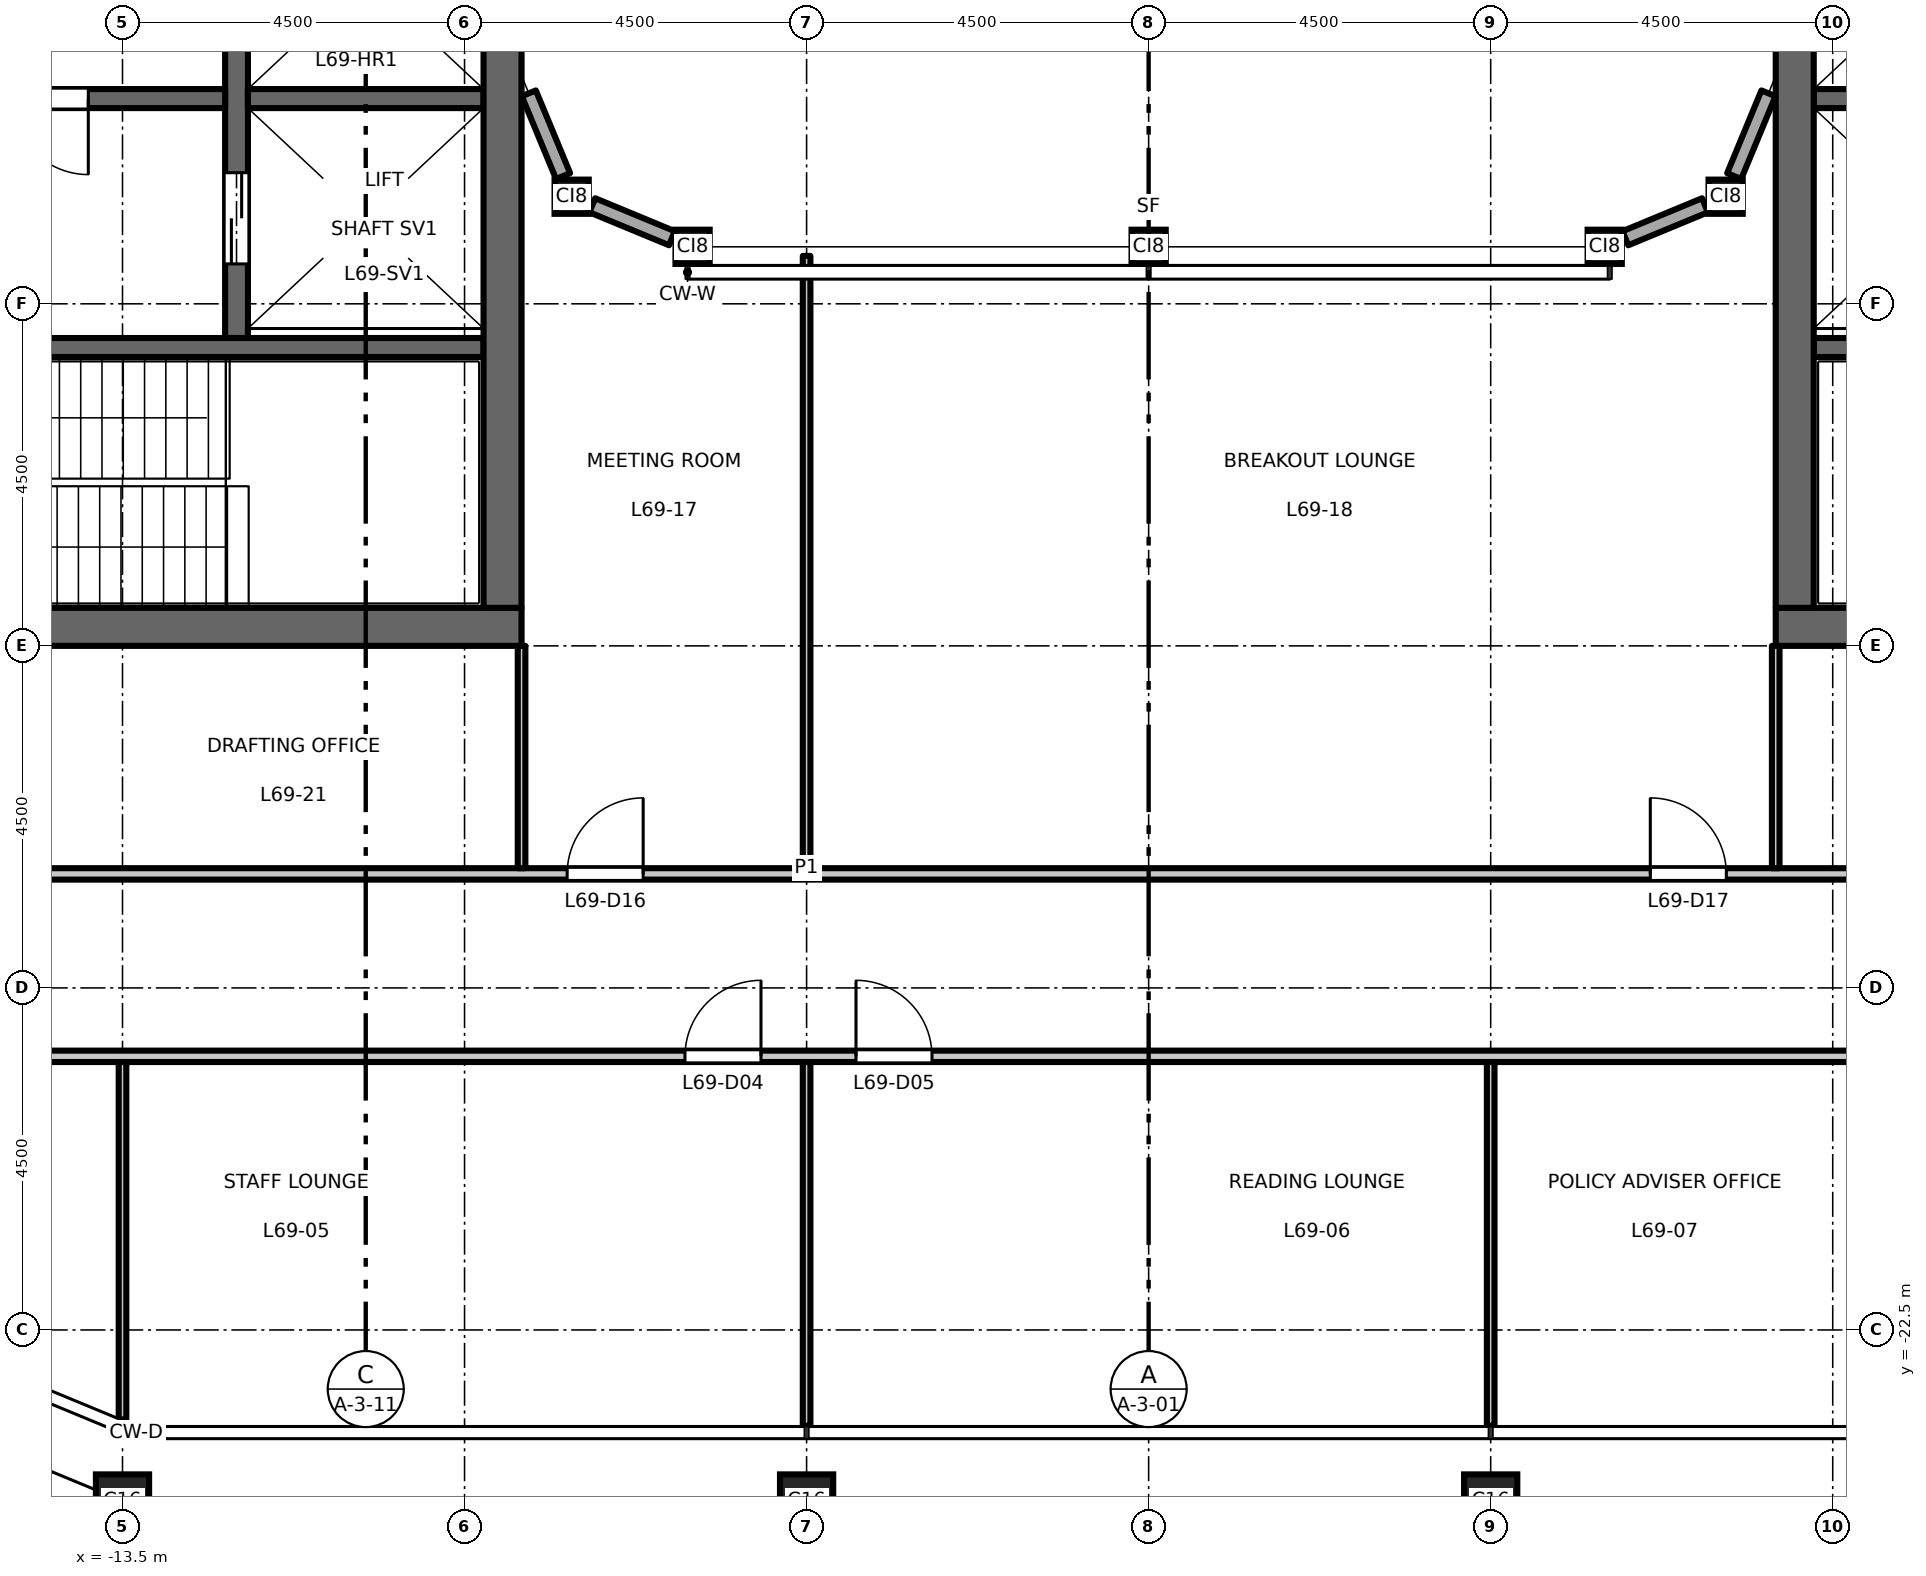
"""IFC4 building model, lengths in metres.
Left out: names, types, materials, properties, quantities, classifications, styles, units other than length and angle.
Written with IfcOpenShell. Run it as: python <this file> out.ifc"""

import sys

from ifc_helpers import new_model, si_unit, direction, frame, frame_2d, origin, origin_2d, place, context, subcontext, project, spatial, rectangle, hollow_rectangle, extrude, element, fill, save


model = new_model("IFC4")
c1 = context("Model", 3, precision=1e-05, world=origin(), true_north=direction((0.0, 1.0)))
c2 = subcontext(c1, "Body", "Model", "MODEL_VIEW")
j1 = project(units=[si_unit("LENGTHUNIT", "METRE"), si_unit("PLANEANGLEUNIT", "RADIAN")], contexts=[c1])
p1 = place(None, origin())
s1 = spatial("IfcSite", under=j1, at=p1, CompositionType="ELEMENT")
p2 = place(p1, origin())
s2 = spatial("IfcBuilding", under=s1, at=p2, CompositionType="ELEMENT")
p3 = place(p2, frame((0.0, 0.0, 321.2)))
s3 = spatial("IfcBuildingStorey", under=s2, at=p3, CompositionType="ELEMENT", Elevation=321.2)
for number, where, z_axis, x_axis in (
    (1, (-13.5, -24.75, 0.0), (0.0, 0.0, 1.0), (1.0, 0.0, 0.0)),
    (2, (-4.5, -24.75, 0.0), (0.0, 0.0, 1.0), (1.0, 0.0, 0.0)),
    (3, (4.5, -24.75, 0.0), (0.0, 0.0, 1.0), (1.0, 0.0, 0.0)),
):
    element("IfcColumn", number, at=place(p3, frame(where, z_axis=z_axis, x_axis=x_axis)), inside=s3, PredefinedType="COLUMN", context=c2, shape_type="SweptSolid", body=[
        extrude(hollow_rectangle(XDim=0.7, YDim=0.7, WallThickness=0.036, at=origin_2d()), origin(), (0.0, 0.0, 1.0), 4.5),
    ])
for number, where, z_axis, x_axis in (
    (4, (-7.591, -7.591, 0.0), (0.0, 0.0, 1.0), (1.0, 0.0, 0.0)),
    (5, (-6.0, -8.25, 0.0), (0.0, 0.0, 1.0), (1.0, 0.0, 0.0)),
    (6, (0.0, -8.25, 0.0), (0.0, 0.0, 1.0), (1.0, 0.0, 0.0)),
    (7, (6.0, -8.25, 0.0), (0.0, 0.0, 1.0), (1.0, 0.0, 0.0)),
    (8, (7.591, -7.591, 0.0), (0.0, 0.0, 1.0), (1.0, 0.0, 0.0)),
):
    element("IfcColumn", number, at=place(p3, frame(where, z_axis=z_axis, x_axis=x_axis)), inside=s3, PredefinedType="COLUMN", context=c2, shape_type="SweptSolid", body=[
        extrude(hollow_rectangle(XDim=0.45, YDim=0.45, WallThickness=0.022, at=origin_2d()), origin(), (0.0, 0.0, 1.0), 4.5),
    ])
p4 = place(p3, frame((-12.0, -9.45, 0.0), z_axis=(0.0, 0.0, 1.0), x_axis=(0.0, 1.0, 0.0)))
e9 = element("IfcWall", 9, at=p4, inside=s3, PredefinedType="SHEAR", context=c2, shape_type="SweptSolid", body=[
    extrude(rectangle(XDim=18.9, YDim=0.3, at=frame_2d((9.45, 0.0))), origin(), (0.0, 0.0, 1.0), 4.35),
])
p5 = place(p4, frame((4.725, 0.0, 0.0)))
e10 = element("IfcOpeningElement", 10, at=p5, cuts=e9, PredefinedType="OPENING", context=c2, shape_type="SweptSolid", body=[
    extrude(rectangle(XDim=1.1, YDim=2.1, at=frame_2d((0.55, 1.05))), frame((0.0, 0.16, 0.0), z_axis=(0.0, -1.0, 0.0), x_axis=(1.0, 0.0, 0.0)), (0.0, 0.0, 1.0), 0.32),
])
p6 = place(p4, frame((7.875, 0.0, 0.0)))
e11 = element("IfcOpeningElement", 11, at=p6, cuts=e9, PredefinedType="OPENING", context=c2, shape_type="SweptSolid", body=[
    extrude(rectangle(XDim=1.1, YDim=2.1, at=frame_2d((0.55, 1.05))), frame((0.0, 0.16, 0.0), z_axis=(0.0, -1.0, 0.0), x_axis=(1.0, 0.0, 0.0)), (0.0, 0.0, 1.0), 0.32),
])
p7 = place(p4, frame((11.025, 0.0, 0.0)))
e12 = element("IfcOpeningElement", 12, at=p7, cuts=e9, PredefinedType="OPENING", context=c2, shape_type="SweptSolid", body=[
    extrude(rectangle(XDim=1.1, YDim=2.1, at=frame_2d((0.55, 1.05))), frame((0.0, 0.16, 0.0), z_axis=(0.0, -1.0, 0.0), x_axis=(1.0, 0.0, 0.0)), (0.0, 0.0, 1.0), 0.32),
])
p8 = place(p4, frame((14.175, 0.0, 0.0)))
e13 = element("IfcOpeningElement", 13, at=p8, cuts=e9, PredefinedType="OPENING", context=c2, shape_type="SweptSolid", body=[
    extrude(rectangle(XDim=1.1, YDim=2.1, at=frame_2d((0.55, 1.05))), frame((0.0, 0.16, 0.0), z_axis=(0.0, -1.0, 0.0), x_axis=(1.0, 0.0, 0.0)), (0.0, 0.0, 1.0), 0.32),
])
p9 = place(p4, frame((16.725, 0.0, 0.0)))
e14 = element("IfcOpeningElement", 14, at=p9, cuts=e9, PredefinedType="OPENING", context=c2, shape_type="SweptSolid", body=[
    extrude(rectangle(XDim=1.2, YDim=2.1, at=frame_2d((0.6, 1.05))), frame((0.0, 0.16, 0.0), z_axis=(0.0, -1.0, 0.0), x_axis=(1.0, 0.0, 0.0)), (0.0, 0.0, 1.0), 0.32),
])
p10 = place(p4, frame((0.975, 0.0, 0.0)))
e15 = element("IfcOpeningElement", 15, at=p10, cuts=e9, PredefinedType="OPENING", context=c2, shape_type="SweptSolid", body=[
    extrude(rectangle(XDim=1.2, YDim=2.1, at=frame_2d((0.6, 1.05))), frame((0.0, 0.16, 0.0), z_axis=(0.0, -1.0, 0.0), x_axis=(1.0, 0.0, 0.0)), (0.0, 0.0, 1.0), 0.32),
])
p11 = place(p3, frame((-12.15, -6.3, 0.0), z_axis=(0.0, 0.0, 1.0), x_axis=(-1.0, 0.0, 0.0)))
e16 = element("IfcWall", 16, at=p11, inside=s3, PredefinedType="SHEAR", context=c2, shape_type="SweptSolid", body=[
    extrude(rectangle(XDim=4.6, YDim=0.25, at=frame_2d((2.3, 0.0))), origin(), (0.0, 0.0, 1.0), 4.35),
])
p12 = place(p11, frame((1.8, 0.0, 0.0)))
e17 = element("IfcOpeningElement", 17, at=p12, cuts=e16, PredefinedType="OPENING", context=c2, shape_type="SweptSolid", body=[
    extrude(rectangle(XDim=1.0, YDim=2.1, at=frame_2d((0.5, 1.05))), frame((0.0, 0.135, 0.0), z_axis=(0.0, -1.0, 0.0), x_axis=(1.0, 0.0, 0.0)), (0.0, 0.0, 1.0), 0.27),
])
p13 = place(p3, frame((-8.75, -6.3, 0.0), z_axis=(0.0, 0.0, 1.0), x_axis=(-1.0, 0.0, 0.0)))
e18 = element("IfcWall", 18, at=p13, inside=s3, PredefinedType="SHEAR", context=c2, shape_type="SweptSolid", body=[
    extrude(rectangle(XDim=3.1, YDim=0.25, at=frame_2d((1.55, 0.0))), origin(), (0.0, 0.0, 1.0), 4.35),
])
p14 = place(p3, frame((-8.75, -9.575, 0.0), z_axis=(0.0, 0.0, 1.0), x_axis=(-1.0, 0.0, 0.0)))
e19 = element("IfcWall", 19, at=p14, inside=s3, PredefinedType="SHEAR", context=c2, shape_type="SweptSolid", body=[
    extrude(rectangle(XDim=8.0, YDim=0.25, at=frame_2d((4.0, 0.0))), origin(), (0.0, 0.0, 1.0), 4.35),
])
p15 = place(p14, frame((6.65, 0.0, 0.0)))
e20 = element("IfcOpeningElement", 20, at=p15, cuts=e19, PredefinedType="OPENING", context=c2, shape_type="SweptSolid", body=[
    extrude(rectangle(XDim=1.1, YDim=2.1, at=frame_2d((0.55, 1.05))), frame((0.0, 0.135, 0.0), z_axis=(0.0, -1.0, 0.0), x_axis=(1.0, 0.0, 0.0)), (0.0, 0.0, 1.0), 0.27),
])
p16 = place(p3, frame((-8.25, -13.25, 0.0), z_axis=(0.0, 0.0, 1.0), x_axis=(-1.0, 0.0, 0.0)))
e21 = element("IfcWall", 21, at=p16, inside=s3, PredefinedType="SHEAR", context=c2, shape_type="SweptSolid", body=[
    extrude(rectangle(XDim=9.0, YDim=0.5, at=frame_2d((4.5, 0.0))), origin(), (0.0, 0.0, 1.0), 4.35),
])
p17 = place(p3, frame((-8.5, -13.0, 0.0), z_axis=(0.0, 0.0, 1.0), x_axis=(0.0, 1.0, 0.0)))
e22 = element("IfcWall", 22, at=p17, inside=s3, PredefinedType="SHEAR", context=c2, shape_type="SweptSolid", body=[
    extrude(rectangle(XDim=26.0, YDim=0.5, at=frame_2d((13.0, 0.0))), origin(), (0.0, 0.0, 1.0), 4.35),
])
p18 = place(p3, frame((8.75, -6.3, 0.0), z_axis=(0.0, 0.0, 1.0), x_axis=(1.0, 0.0, 0.0)))
e23 = element("IfcWall", 23, at=p18, inside=s3, PredefinedType="SHEAR", context=c2, shape_type="SweptSolid", body=[
    extrude(rectangle(XDim=3.1, YDim=0.25, at=frame_2d((1.55, 0.0))), origin(), (0.0, 0.0, 1.0), 4.35),
])
p19 = place(p3, frame((8.75, -9.575, 0.0), z_axis=(0.0, 0.0, 1.0), x_axis=(1.0, 0.0, 0.0)))
e24 = element("IfcWall", 24, at=p19, inside=s3, PredefinedType="SHEAR", context=c2, shape_type="SweptSolid", body=[
    extrude(rectangle(XDim=8.0, YDim=0.25, at=frame_2d((4.0, 0.0))), origin(), (0.0, 0.0, 1.0), 4.35),
])
p20 = place(p19, frame((6.65, 0.0, 0.0)))
e25 = element("IfcOpeningElement", 25, at=p20, cuts=e24, PredefinedType="OPENING", context=c2, shape_type="SweptSolid", body=[
    extrude(rectangle(XDim=1.1, YDim=2.1, at=frame_2d((0.55, 1.05))), frame((0.0, 0.135, 0.0), z_axis=(0.0, -1.0, 0.0), x_axis=(1.0, 0.0, 0.0)), (0.0, 0.0, 1.0), 0.27),
])
p21 = place(p3, frame((8.25, -13.25, 0.0), z_axis=(0.0, 0.0, 1.0), x_axis=(1.0, 0.0, 0.0)))
e26 = element("IfcWall", 26, at=p21, inside=s3, PredefinedType="SHEAR", context=c2, shape_type="SweptSolid", body=[
    extrude(rectangle(XDim=9.0, YDim=0.5, at=frame_2d((4.5, 0.0))), origin(), (0.0, 0.0, 1.0), 4.35),
])
p22 = place(p3, frame((8.5, -13.0, 0.0), z_axis=(0.0, 0.0, 1.0), x_axis=(0.0, 1.0, 0.0)))
e27 = element("IfcWall", 27, at=p22, inside=s3, PredefinedType="SHEAR", context=c2, shape_type="SweptSolid", body=[
    extrude(rectangle(XDim=26.0, YDim=0.5, at=frame_2d((13.0, 0.0))), origin(), (0.0, 0.0, 1.0), 4.35),
])
p23 = place(p3, frame((6.271, -8.137, 0.0), z_axis=(0.0, 0.0, 1.0), x_axis=(0.923864661962, 0.382719331074, 0.0)))
e28 = element("IfcWall", 28, at=p23, inside=s3, PredefinedType="STANDARD", context=c2, shape_type="SweptSolid", body=[
    extrude(rectangle(XDim=1.134, YDim=0.2, at=frame_2d((0.567, 0.0))), origin(), (0.0, 0.0, 1.0), 4.01),
])
for number, where, z_axis, x_axis in (
    (29, (7.703, -7.319, 0.0), (0.0, 0.0, 1.0), (0.383, 0.924, 0.0)),
    (30, (-8.154, -6.231, 0.0), (0.0, 0.0, 1.0), (0.383, -0.924, 0.0)),
):
    element("IfcWall", number, at=place(p3, frame(where, z_axis=z_axis, x_axis=x_axis)), inside=s3, PredefinedType="STANDARD", context=c2, shape_type="SweptSolid", body=[
        extrude(rectangle(XDim=1.178, YDim=0.2, at=frame_2d((0.589, 0.0))), origin(), (0.0, 0.0, 1.0), 4.01),
    ])
p24 = place(p3, frame((-7.319, -7.703, 0.0), z_axis=(0.0, 0.0, 1.0), x_axis=(0.923864661962, -0.382719331074, 0.0)))
e31 = element("IfcWall", 31, at=p24, inside=s3, PredefinedType="STANDARD", context=c2, shape_type="SweptSolid", body=[
    extrude(rectangle(XDim=1.134, YDim=0.2, at=frame_2d((0.567, 0.0))), origin(), (0.0, 0.0, 1.0), 4.01),
])
p25 = place(p3, frame((-21.441, -18.9, 0.0), z_axis=(0.0, 0.0, 1.0), x_axis=(1.0, 0.0, 0.0)))
e32 = element("IfcWall", 32, at=p25, inside=s3, PredefinedType="PARTITIONING", context=c2, shape_type="SweptSolid", body=[
    extrude(rectangle(XDim=42.882, YDim=0.15, at=frame_2d((21.441, 0.0))), origin(), (0.0, 0.0, 1.0), 4.35),
])
p26 = place(p25, frame((15.341, 0.0, 0.0)))
e33 = element("IfcOpeningElement", 33, at=p26, cuts=e32, PredefinedType="OPENING", context=c2, shape_type="SweptSolid", body=[
    extrude(rectangle(XDim=1.0, YDim=2.1, at=frame_2d((0.5, 1.05))), frame((0.0, 0.085, 0.0), z_axis=(0.0, -1.0, 0.0), x_axis=(1.0, 0.0, 0.0)), (0.0, 0.0, 1.0), 0.17),
])
p27 = place(p25, frame((17.591, 0.0, 0.0)))
e34 = element("IfcOpeningElement", 34, at=p27, cuts=e32, PredefinedType="OPENING", context=c2, shape_type="SweptSolid", body=[
    extrude(rectangle(XDim=1.0, YDim=2.1, at=frame_2d((0.5, 1.05))), frame((0.0, 0.085, 0.0), z_axis=(0.0, -1.0, 0.0), x_axis=(1.0, 0.0, 0.0)), (0.0, 0.0, 1.0), 0.17),
])
p28 = place(p25, frame((33.341, 0.0, 0.0)))
e35 = element("IfcOpeningElement", 35, at=p28, cuts=e32, PredefinedType="OPENING", context=c2, shape_type="SweptSolid", body=[
    extrude(rectangle(XDim=1.0, YDim=2.1, at=frame_2d((0.5, 1.05))), frame((0.0, 0.085, 0.0), z_axis=(0.0, -1.0, 0.0), x_axis=(1.0, 0.0, 0.0)), (0.0, 0.0, 1.0), 0.17),
])
p29 = place(p25, frame((0.65, 0.0, 0.0)))
e36 = element("IfcOpeningElement", 36, at=p29, cuts=e32, PredefinedType="OPENING", context=c2, shape_type="SweptSolid", body=[
    extrude(rectangle(XDim=1.0, YDim=2.1, at=frame_2d((0.5, 1.05))), frame((0.0, 0.085, 0.0), z_axis=(0.0, -1.0, 0.0), x_axis=(1.0, 0.0, 0.0)), (0.0, 0.0, 1.0), 0.17),
])
p30 = place(p25, frame((41.341, 0.0, 0.0)))
e37 = element("IfcOpeningElement", 37, at=p30, cuts=e32, PredefinedType="OPENING", context=c2, shape_type="SweptSolid", body=[
    extrude(rectangle(XDim=1.0, YDim=2.1, at=frame_2d((0.5, 1.05))), frame((0.0, 0.085, 0.0), z_axis=(0.0, -1.0, 0.0), x_axis=(1.0, 0.0, 0.0)), (0.0, 0.0, 1.0), 0.17),
])
p31 = place(p3, frame((-17.325, -16.5, 0.0), z_axis=(0.0, 0.0, 1.0), x_axis=(1.0, 0.0, 0.0)))
e38 = element("IfcWall", 38, at=p31, inside=s3, PredefinedType="PARTITIONING", context=c2, shape_type="SweptSolid", body=[
    extrude(rectangle(XDim=34.65, YDim=0.15, at=frame_2d((17.325, 0.0))), origin(), (0.0, 0.0, 1.0), 4.35),
])
p32 = place(p31, frame((9.675, 0.0, 0.0)))
e39 = element("IfcOpeningElement", 39, at=p32, cuts=e38, PredefinedType="OPENING", context=c2, shape_type="SweptSolid", body=[
    extrude(rectangle(XDim=1.0, YDim=2.1, at=frame_2d((0.5, 1.05))), frame((0.0, 0.085, 0.0), z_axis=(0.0, -1.0, 0.0), x_axis=(1.0, 0.0, 0.0)), (0.0, 0.0, 1.0), 0.17),
])
p33 = place(p31, frame((23.925, 0.0, 0.0)))
e40 = element("IfcOpeningElement", 40, at=p33, cuts=e38, PredefinedType="OPENING", context=c2, shape_type="SweptSolid", body=[
    extrude(rectangle(XDim=1.0, YDim=2.1, at=frame_2d((0.5, 1.05))), frame((0.0, 0.085, 0.0), z_axis=(0.0, -1.0, 0.0), x_axis=(1.0, 0.0, 0.0)), (0.0, 0.0, 1.0), 0.17),
])
p34 = place(p31, frame((0.675, 0.0, 0.0)))
e41 = element("IfcOpeningElement", 41, at=p34, cuts=e38, PredefinedType="OPENING", context=c2, shape_type="SweptSolid", body=[
    extrude(rectangle(XDim=1.0, YDim=2.1, at=frame_2d((0.5, 1.05))), frame((0.0, 0.085, 0.0), z_axis=(0.0, -1.0, 0.0), x_axis=(1.0, 0.0, 0.0)), (0.0, 0.0, 1.0), 0.17),
])
p35 = place(p31, frame((32.925, 0.0, 0.0)))
e42 = element("IfcOpeningElement", 42, at=p35, cuts=e38, PredefinedType="OPENING", context=c2, shape_type="SweptSolid", body=[
    extrude(rectangle(XDim=1.0, YDim=2.1, at=frame_2d((0.5, 1.05))), frame((0.0, 0.085, 0.0), z_axis=(0.0, -1.0, 0.0), x_axis=(1.0, 0.0, 0.0)), (0.0, 0.0, 1.0), 0.17),
])
p36 = place(p3, frame((-13.5, -23.678, 0.0), z_axis=(0.0, 0.0, 1.0), x_axis=(0.0, 1.0, 0.0)))
e43 = element("IfcWall", 43, at=p36, inside=s3, PredefinedType="PARTITIONING", context=c2, shape_type="SweptSolid", body=[
    extrude(rectangle(XDim=4.703, YDim=0.1, at=frame_2d((2.352, 0.0))), origin(), (0.0, 0.0, 1.0), 3.75),
])
p37 = place(p3, frame((-8.25, -16.425, 0.0), z_axis=(0.0, 0.0, 1.0), x_axis=(0.0, 1.0, 0.0)))
e44 = element("IfcWall", 44, at=p37, inside=s3, PredefinedType="PARTITIONING", context=c2, shape_type="SweptSolid", body=[
    extrude(rectangle(XDim=2.925, YDim=0.1, at=frame_2d((1.462, 0.0))), origin(), (0.0, 0.0, 1.0), 4.35),
])
p38 = place(p3, frame((-4.5, -23.76, 0.0), z_axis=(0.0, 0.0, 1.0), x_axis=(0.0, 1.0, 0.0)))
e45 = element("IfcWall", 45, at=p38, inside=s3, PredefinedType="PARTITIONING", context=c2, shape_type="SweptSolid", body=[
    extrude(rectangle(XDim=4.785, YDim=0.1, at=frame_2d((2.393, 0.0))), origin(), (0.0, 0.0, 1.0), 3.65),
])
p39 = place(p3, frame((-4.5, -16.425, 0.0), z_axis=(0.0, 0.0, 1.0), x_axis=(0.0, 1.0, 0.0)))
e46 = element("IfcWall", 46, at=p39, inside=s3, PredefinedType="PARTITIONING", context=c2, shape_type="SweptSolid", body=[
    extrude(rectangle(XDim=8.055, YDim=0.1, at=frame_2d((4.027, 0.0))), origin(), (0.0, 0.0, 1.0), 3.65),
])
p40 = place(p3, frame((4.5, -23.76, 0.0), z_axis=(0.0, 0.0, 1.0), x_axis=(0.0, 1.0, 0.0)))
e47 = element("IfcWall", 47, at=p40, inside=s3, PredefinedType="PARTITIONING", context=c2, shape_type="SweptSolid", body=[
    extrude(rectangle(XDim=4.785, YDim=0.1, at=frame_2d((2.393, 0.0))), origin(), (0.0, 0.0, 1.0), 3.65),
])
p41 = place(p3, frame((8.25, -16.425, 0.0), z_axis=(0.0, 0.0, 1.0), x_axis=(0.0, 1.0, 0.0)))
e48 = element("IfcWall", 48, at=p41, inside=s3, PredefinedType="PARTITIONING", context=c2, shape_type="SweptSolid", body=[
    extrude(rectangle(XDim=2.925, YDim=0.1, at=frame_2d((1.462, 0.0))), origin(), (0.0, 0.0, 1.0), 4.35),
])
p42 = place(p12, origin())
e49 = element("IfcDoor", 49, at=p42, inside=s3, OperationType="SINGLE_SWING_RIGHT", PredefinedType="DOOR", context=c2, shape_type="SweptSolid", body=[
    extrude(rectangle(XDim=1.0, YDim=2.1, at=frame_2d((0.5, 1.05))), frame((0.0, 0.025, 0.0), z_axis=(0.0, -1.0, 0.0), x_axis=(1.0, 0.0, 0.0)), (0.0, 0.0, 1.0), 0.05),
])
fill(e17, e49)
p43 = place(p10, origin())
e50 = element("IfcDoor", 50, at=p43, inside=s3, OperationType="DOUBLE_DOOR_SLIDING", PredefinedType="DOOR", context=c2, shape_type="SweptSolid", body=[
    extrude(rectangle(XDim=1.2, YDim=2.1, at=frame_2d((0.6, 1.05))), frame((0.0, 0.025, 0.0), z_axis=(0.0, -1.0, 0.0), x_axis=(1.0, 0.0, 0.0)), (0.0, 0.0, 1.0), 0.05),
])
fill(e15, e50)
p44 = place(p26, origin())
e51 = element("IfcDoor", 51, at=p44, inside=s3, OperationType="SINGLE_SWING_RIGHT", PredefinedType="DOOR", context=c2, shape_type="SweptSolid", body=[
    extrude(rectangle(XDim=1.0, YDim=2.1, at=frame_2d((0.5, 1.05))), frame((0.0, 0.025, 0.0), z_axis=(0.0, -1.0, 0.0), x_axis=(1.0, 0.0, 0.0)), (0.0, 0.0, 1.0), 0.05),
])
fill(e33, e51)
p45 = place(p27, origin())
e52 = element("IfcDoor", 52, at=p45, inside=s3, OperationType="SINGLE_SWING_LEFT", PredefinedType="DOOR", context=c2, shape_type="SweptSolid", body=[
    extrude(rectangle(XDim=1.0, YDim=2.1, at=frame_2d((0.5, 1.05))), frame((0.0, 0.025, 0.0), z_axis=(0.0, -1.0, 0.0), x_axis=(1.0, 0.0, 0.0)), (0.0, 0.0, 1.0), 0.05),
])
fill(e34, e52)
p46 = place(p32, origin())
e53 = element("IfcDoor", 53, at=p46, inside=s3, OperationType="SINGLE_SWING_RIGHT", PredefinedType="DOOR", context=c2, shape_type="SweptSolid", body=[
    extrude(rectangle(XDim=1.0, YDim=2.1, at=frame_2d((0.5, 1.05))), frame((0.0, 0.025, 0.0), z_axis=(0.0, -1.0, 0.0), x_axis=(1.0, 0.0, 0.0)), (0.0, 0.0, 1.0), 0.05),
])
fill(e39, e53)
p47 = place(p33, origin())
e54 = element("IfcDoor", 54, at=p47, inside=s3, OperationType="SINGLE_SWING_LEFT", PredefinedType="DOOR", context=c2, shape_type="SweptSolid", body=[
    extrude(rectangle(XDim=1.0, YDim=2.1, at=frame_2d((0.5, 1.05))), frame((0.0, 0.025, 0.0), z_axis=(0.0, -1.0, 0.0), x_axis=(1.0, 0.0, 0.0)), (0.0, 0.0, 1.0), 0.05),
])
fill(e40, e54)
save(model, sys.argv[1])
